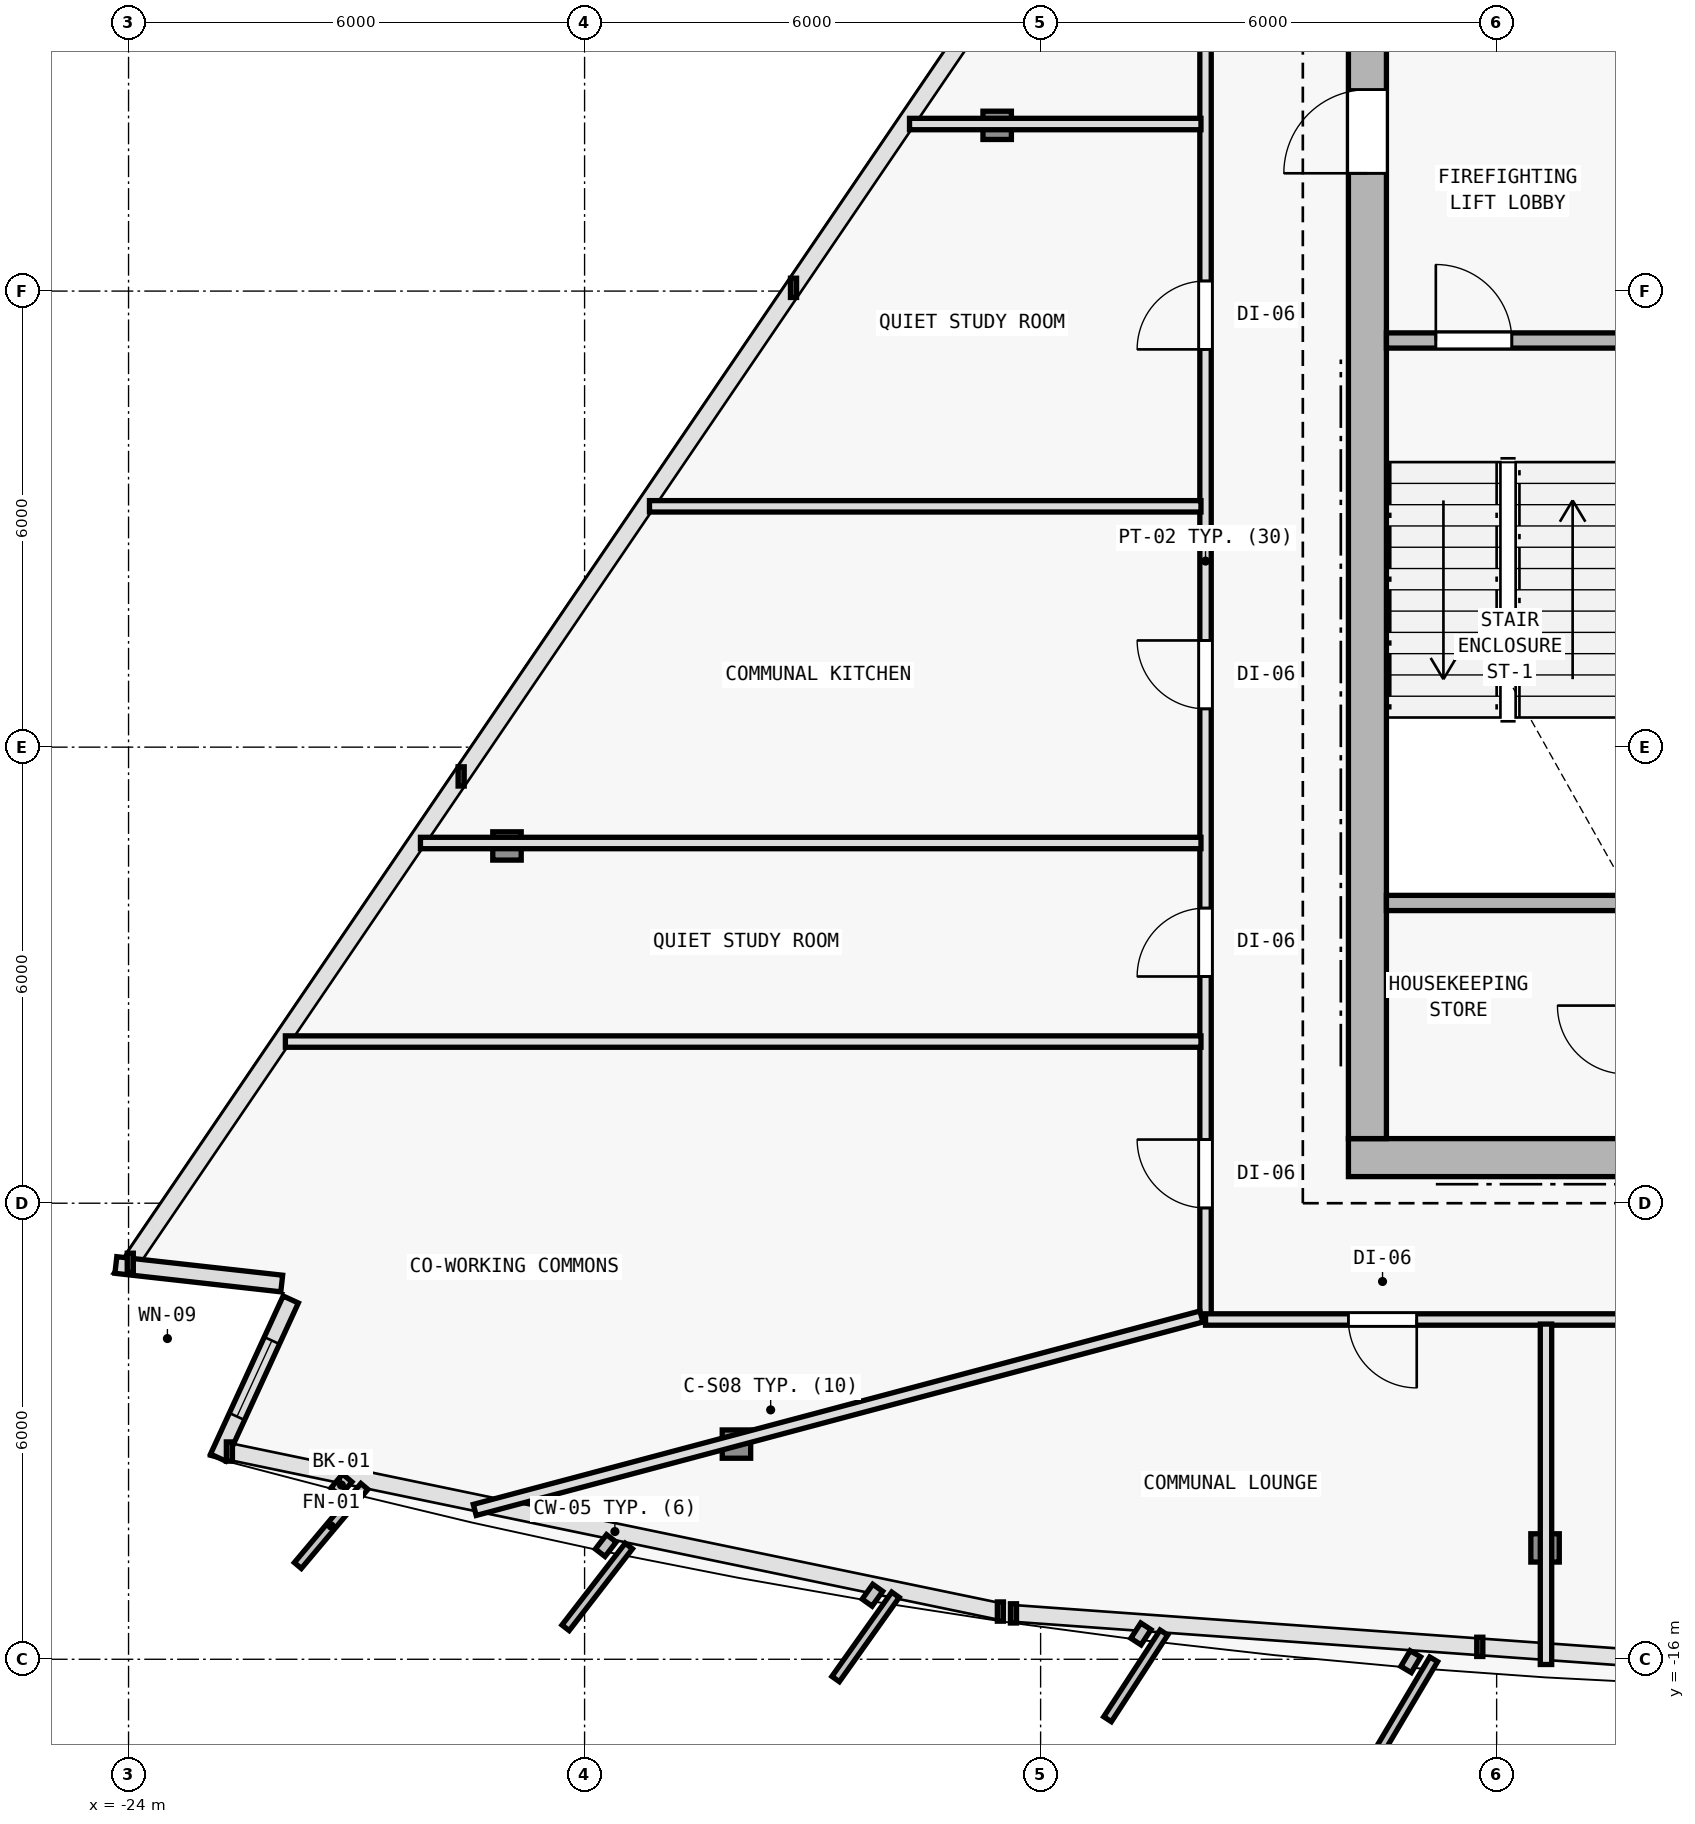
"""IFC4 building model, lengths in metres.
Left out: names, types, materials, properties, quantities, classifications, styles, units other than length and angle.
Written with IfcOpenShell. Run it as: python <this file> out.ifc"""

import sys

from ifc_helpers import new_model, si_unit, direction, frame, frame_2d, origin, origin_2d, place, context, subcontext, project, spatial, rectangle, i_section, extrude, element, fill, save


model = new_model("IFC4")
c1 = context("Model", 3, precision=1e-05, world=origin(), true_north=direction((0.0, 1.0)))
c2 = subcontext(c1, "Body", "Model", "MODEL_VIEW")
j1 = project(units=[si_unit("LENGTHUNIT", "METRE"), si_unit("PLANEANGLEUNIT", "RADIAN")], contexts=[c1])
p1 = place(None, origin())
s1 = spatial("IfcSite", under=j1, at=p1, CompositionType="ELEMENT")
p2 = place(p1, origin())
s2 = spatial("IfcBuilding", under=s1, at=p2, CompositionType="ELEMENT")
p3 = place(p2, frame((0.0, 0.0, 246.3)))
s3 = spatial("IfcBuildingStorey", under=s2, at=p3, CompositionType="ELEMENT", Elevation=246.3)
for number, where, z_axis, x_axis in (
    (1, (-7.7, -9.4, 0.0), (0.0, 0.0, 1.0), (1.0, 0.0, 0.0)),
    (2, (-7.7, 2.0, 0.0), (0.0, 0.0, 1.0), (1.0, 0.0, 0.0)),
):
    element("IfcColumn", number, at=place(p3, frame(where, z_axis=z_axis, x_axis=x_axis)), inside=s3, PredefinedType="COLUMN", context=c2, shape_type="SweptSolid", body=[
        extrude(i_section(OverallWidth=0.398, OverallDepth=0.387, WebThickness=0.013, FlangeThickness=0.022, FilletRadius=0.015, at=origin_2d()), origin(), (0.0, 0.0, 1.0), 4.5),
    ])
p4 = place(p3, frame((-16.002, -13.169, 0.005), z_axis=(0.016525223725, 0.026799129265, 0.999504238936), x_axis=(-0.851183725565, 0.524867855115, 0.0)))
e3 = element("IfcColumn", 3, at=p4, inside=s3, PredefinedType="COLUMN", context=c2, shape_type="SweptSolid", body=[
    extrude(i_section(OverallWidth=0.374, OverallDepth=0.372, WebThickness=0.012, FlangeThickness=0.02, FilletRadius=0.015, at=origin_2d()), origin(), (0.0, 0.0, 1.0), 4.491),
])
p5 = place(p3, frame((-5.363, -14.535, 0.005), z_axis=(0.005545112284, 0.028160472186, 0.99958803491), x_axis=(-0.981159154887, 0.193201223549, 0.0)))
e4 = element("IfcColumn", 4, at=p5, inside=s3, PredefinedType="COLUMN", context=c2, shape_type="SweptSolid", body=[
    extrude(i_section(OverallWidth=0.374, OverallDepth=0.372, WebThickness=0.012, FlangeThickness=0.02, FilletRadius=0.015, at=origin_2d()), origin(), (0.0, 0.0, 1.0), 4.491),
])
p6 = place(p3, frame((-12.571, 4.181, 0.005), z_axis=(0.01359491219, 0.007613150827, 0.99987860178), x_axis=(-0.488603368932, 0.87250601595, 0.0)))
e5 = element("IfcColumn", 5, at=p6, inside=s3, PredefinedType="COLUMN", context=c2, shape_type="SweptSolid", body=[
    extrude(i_section(OverallWidth=0.374, OverallDepth=0.372, WebThickness=0.012, FlangeThickness=0.02, FilletRadius=0.015, at=origin_2d()), origin(), (0.0, 0.0, 1.0), 4.49),
])
p7 = place(p3, frame((-19.021, -5.3, 0.005), z_axis=(0.020170196927, 0.017234373116, 0.99964800782), x_axis=(-0.649609258817, 0.760268249278, 0.0)))
e6 = element("IfcColumn", 6, at=p7, inside=s3, PredefinedType="COLUMN", context=c2, shape_type="SweptSolid", body=[
    extrude(i_section(OverallWidth=0.374, OverallDepth=0.372, WebThickness=0.012, FlangeThickness=0.02, FilletRadius=0.015, at=origin_2d()), origin(), (0.0, 0.0, 1.0), 4.49),
])
p8 = place(p3, frame((-21.985, -11.057, 0.0), z_axis=(0.0, 0.0, 1.0), x_axis=(-0.993823926228, 0.110968480463, 0.0)))
e7 = element("IfcWall", 7, at=p8, inside=s3, PredefinedType="SOLIDWALL", context=c2, shape_type="SweptSolid", body=[
    extrude(rectangle(XDim=2.196, YDim=0.22, at=frame_2d((1.098, 0.0))), origin(), (0.0, 0.0, 1.0), 4.25),
])
p9 = place(p3, frame((-22.822, -13.347, 0.0), z_axis=(0.0, 0.0, 1.0), x_axis=(0.417447808253, 0.908700900949, 0.0)))
e8 = element("IfcWall", 8, at=p9, inside=s3, PredefinedType="SOLIDWALL", context=c2, shape_type="SweptSolid", body=[
    extrude(rectangle(XDim=2.289, YDim=0.22, at=frame_2d((1.145, 0.0))), origin(), (0.0, 0.0, 1.0), 4.25),
])
p10 = place(p9, frame((0.594, 0.0, 0.62)))
e9 = element("IfcOpeningElement", 9, at=p10, cuts=e8, PredefinedType="OPENING", context=c2, shape_type="SweptSolid", body=[
    extrude(rectangle(XDim=1.1, YDim=1.8, at=frame_2d((0.55, 0.9))), frame((0.0, 0.12, 0.0), z_axis=(0.0, -1.0, 0.0), x_axis=(1.0, 0.0, 0.0)), (0.0, 0.0, 1.0), 0.24),
])
p11 = place(p3, frame((-7.95, -9.4, 0.0), z_axis=(0.0, 0.0, 1.0), x_axis=(1.0, 0.0, 0.0)))
e10 = element("IfcWall", 10, at=p11, inside=s3, PredefinedType="SHEAR", context=c2, shape_type="SweptSolid", body=[
    extrude(rectangle(XDim=15.9, YDim=0.5, at=frame_2d((7.95, 0.0))), origin(), (0.0, 0.0, 1.0), 4.25),
])
p12 = place(p11, frame((9.6, 0.0, 0.0)))
e11 = element("IfcOpeningElement", 11, at=p12, cuts=e10, PredefinedType="OPENING", context=c2, shape_type="SweptSolid", body=[
    extrude(rectangle(XDim=1.5, YDim=2.2, at=frame_2d((0.75, 1.1))), frame((0.0, 0.26, 0.0), z_axis=(0.0, -1.0, 0.0), x_axis=(1.0, 0.0, 0.0)), (0.0, 0.0, 1.0), 0.52),
])
p13 = place(p3, frame((-7.7, -9.15, 0.0), z_axis=(0.0, 0.0, 1.0), x_axis=(0.0, 1.0, 0.0)))
e12 = element("IfcWall", 12, at=p13, inside=s3, PredefinedType="SHEAR", context=c2, shape_type="SweptSolid", body=[
    extrude(rectangle(XDim=19.1, YDim=0.5, at=frame_2d((9.55, 0.0))), origin(), (0.0, 0.0, 1.0), 4.25),
])
p14 = place(p13, frame((12.7, 0.0, 0.0)))
e13 = element("IfcOpeningElement", 13, at=p14, cuts=e12, PredefinedType="OPENING", context=c2, shape_type="SweptSolid", body=[
    extrude(rectangle(XDim=1.1, YDim=2.15, at=frame_2d((0.55, 1.075))), frame((0.0, 0.26, 0.0), z_axis=(0.0, -1.0, 0.0), x_axis=(1.0, 0.0, 0.0)), (0.0, 0.0, 1.0), 0.52),
])
p15 = place(p3, frame((-7.45, 1.35, 0.0), z_axis=(0.0, 0.0, 1.0), x_axis=(1.0, 0.0, 0.0)))
e14 = element("IfcWall", 14, at=p15, inside=s3, PredefinedType="SOLIDWALL", context=c2, shape_type="SweptSolid", body=[
    extrude(rectangle(XDim=3.4, YDim=0.2, at=frame_2d((1.7, 0.0))), origin(), (0.0, 0.0, 1.0), 4.25),
])
p16 = place(p15, frame((0.65, 0.0, 0.0)))
e15 = element("IfcOpeningElement", 15, at=p16, cuts=e14, PredefinedType="OPENING", context=c2, shape_type="SweptSolid", body=[
    extrude(rectangle(XDim=1.0, YDim=2.15, at=frame_2d((0.5, 1.075))), frame((0.0, 0.11, 0.0), z_axis=(0.0, -1.0, 0.0), x_axis=(1.0, 0.0, 0.0)), (0.0, 0.0, 1.0), 0.22),
])
p17 = place(p3, frame((-7.45, -6.05, 0.0), z_axis=(0.0, 0.0, 1.0), x_axis=(1.0, 0.0, 0.0)))
e16 = element("IfcWall", 16, at=p17, inside=s3, PredefinedType="SOLIDWALL", context=c2, shape_type="SweptSolid", body=[
    extrude(rectangle(XDim=3.4, YDim=0.2, at=frame_2d((1.7, 0.0))), origin(), (0.0, 0.0, 1.0), 4.25),
])
p18 = place(p3, frame((-9.83, -11.53, 0.0), z_axis=(0.0, 0.0, 1.0), x_axis=(0.0, 1.0, 0.0)))
e17 = element("IfcWall", 17, at=p18, inside=s3, PredefinedType="PARTITIONING", context=c2, shape_type="SweptSolid", body=[
    extrude(rectangle(XDim=19.956, YDim=0.15, at=frame_2d((9.978, 0.0))), origin(), (0.0, 0.0, 1.0), 3.725),
])
p19 = place(p18, frame((8.034, 0.0, 0.0)))
e18 = element("IfcOpeningElement", 18, at=p19, cuts=e17, PredefinedType="OPENING", context=c2, shape_type="SweptSolid", body=[
    extrude(rectangle(XDim=0.9, YDim=2.1, at=frame_2d((0.45, 1.05))), frame((0.0, 0.085, 0.0), z_axis=(0.0, -1.0, 0.0), x_axis=(1.0, 0.0, 0.0)), (0.0, 0.0, 1.0), 0.17),
])
p20 = place(p18, frame((4.513, 0.0, 0.0)))
e19 = element("IfcOpeningElement", 19, at=p20, cuts=e17, PredefinedType="OPENING", context=c2, shape_type="SweptSolid", body=[
    extrude(rectangle(XDim=0.9, YDim=2.1, at=frame_2d((0.45, 1.05))), frame((0.0, 0.085, 0.0), z_axis=(0.0, -1.0, 0.0), x_axis=(1.0, 0.0, 0.0)), (0.0, 0.0, 1.0), 0.17),
])
p21 = place(p18, frame((1.468, 0.0, 0.0)))
e20 = element("IfcOpeningElement", 20, at=p21, cuts=e17, PredefinedType="OPENING", context=c2, shape_type="SweptSolid", body=[
    extrude(rectangle(XDim=0.9, YDim=2.1, at=frame_2d((0.45, 1.05))), frame((0.0, 0.085, 0.0), z_axis=(0.0, -1.0, 0.0), x_axis=(1.0, 0.0, 0.0)), (0.0, 0.0, 1.0), 0.17),
])
p22 = place(p18, frame((12.763, 0.0, 0.0)))
e21 = element("IfcOpeningElement", 21, at=p22, cuts=e17, PredefinedType="OPENING", context=c2, shape_type="SweptSolid", body=[
    extrude(rectangle(XDim=0.9, YDim=2.1, at=frame_2d((0.45, 1.05))), frame((0.0, 0.085, 0.0), z_axis=(0.0, -1.0, 0.0), x_axis=(1.0, 0.0, 0.0)), (0.0, 0.0, 1.0), 0.17),
])
p23 = place(p3, frame((9.83, -11.53, 0.0), z_axis=(0.0, 0.0, 1.0), x_axis=(-1.0, 0.0, 0.0)))
e22 = element("IfcWall", 22, at=p23, inside=s3, PredefinedType="PARTITIONING", context=c2, shape_type="SweptSolid", body=[
    extrude(rectangle(XDim=19.66, YDim=0.15, at=frame_2d((9.83, 0.0))), origin(), (0.0, 0.0, 1.0), 3.905),
])
p24 = place(p23, frame((16.881, 0.0, 0.0)))
e23 = element("IfcOpeningElement", 23, at=p24, cuts=e22, PredefinedType="OPENING", context=c2, shape_type="SweptSolid", body=[
    extrude(rectangle(XDim=0.9, YDim=2.1, at=frame_2d((0.45, 1.05))), frame((0.0, 0.085, 0.0), z_axis=(0.0, -1.0, 0.0), x_axis=(1.0, 0.0, 0.0)), (0.0, 0.0, 1.0), 0.17),
])
p25 = place(p23, frame((11.78, 0.0, 0.0)))
e24 = element("IfcOpeningElement", 24, at=p25, cuts=e22, PredefinedType="OPENING", context=c2, shape_type="SweptSolid", body=[
    extrude(rectangle(XDim=0.9, YDim=2.1, at=frame_2d((0.45, 1.05))), frame((0.0, 0.085, 0.0), z_axis=(0.0, -1.0, 0.0), x_axis=(1.0, 0.0, 0.0)), (0.0, 0.0, 1.0), 0.17),
])
p26 = place(p23, frame((6.43, 0.0, 0.0)))
e25 = element("IfcOpeningElement", 25, at=p26, cuts=e22, PredefinedType="OPENING", context=c2, shape_type="SweptSolid", body=[
    extrude(rectangle(XDim=0.9, YDim=2.1, at=frame_2d((0.45, 1.05))), frame((0.0, 0.085, 0.0), z_axis=(0.0, -1.0, 0.0), x_axis=(1.0, 0.0, 0.0)), (0.0, 0.0, 1.0), 0.17),
])
p27 = place(p23, frame((1.879, 0.0, 0.0)))
e26 = element("IfcOpeningElement", 26, at=p27, cuts=e22, PredefinedType="OPENING", context=c2, shape_type="SweptSolid", body=[
    extrude(rectangle(XDim=0.9, YDim=2.1, at=frame_2d((0.45, 1.05))), frame((0.0, 0.085, 0.0), z_axis=(0.0, -1.0, 0.0), x_axis=(1.0, 0.0, 0.0)), (0.0, 0.0, 1.0), 0.17),
])
p28 = place(p3, frame((-9.884, -11.49, 0.0), z_axis=(0.0, 0.0, 1.0), x_axis=(-0.96635442317, -0.257214169168, 0.0)))
e27 = element("IfcWall", 27, at=p28, inside=s3, PredefinedType="PARTITIONING", context=c2, shape_type="SweptSolid", body=[
    extrude(rectangle(XDim=9.894, YDim=0.15, at=frame_2d((4.947, 0.0))), origin(), (0.0, 0.0, 1.0), 3.775),
])
p29 = place(p3, frame((-5.351, -11.59, 0.0), z_axis=(0.0, 0.0, 1.0), x_axis=(0.0, -1.0, 0.0)))
e28 = element("IfcWall", 28, at=p29, inside=s3, PredefinedType="PARTITIONING", context=c2, shape_type="SweptSolid", body=[
    extrude(rectangle(XDim=4.479, YDim=0.15, at=frame_2d((2.239, 0.0))), origin(), (0.0, 0.0, 1.0), 3.775),
])
p30 = place(p3, frame((-9.89, 4.198, 0.0), z_axis=(0.0, 0.0, 1.0), x_axis=(-1.0, 0.0, 0.0)))
e29 = element("IfcWall", 29, at=p30, inside=s3, PredefinedType="PARTITIONING", context=c2, shape_type="SweptSolid", body=[
    extrude(rectangle(XDim=3.835, YDim=0.15, at=frame_2d((1.917, 0.0))), origin(), (0.0, 0.0, 1.0), 3.725),
])
p31 = place(p3, frame((-9.89, -5.261, 0.0), z_axis=(0.0, 0.0, 1.0), x_axis=(-1.0, 0.0, 0.0)))
e30 = element("IfcWall", 30, at=p31, inside=s3, PredefinedType="PARTITIONING", context=c2, shape_type="SweptSolid", body=[
    extrude(rectangle(XDim=10.27, YDim=0.15, at=frame_2d((5.135, 0.0))), origin(), (0.0, 0.0, 1.0), 3.775),
])
p32 = place(p3, frame((-9.89, -0.832, 0.0), z_axis=(0.0, 0.0, 1.0), x_axis=(-0.999999999434, -3.3646243e-05, 0.0)))
e31 = element("IfcWall", 31, at=p32, inside=s3, PredefinedType="PARTITIONING", context=c2, shape_type="SweptSolid", body=[
    extrude(rectangle(XDim=7.256, YDim=0.15, at=frame_2d((3.628, 0.0))), origin(), (0.0, 0.0, 1.0), 3.775),
])
p33 = place(p3, frame((-9.89, -7.873, 0.0), z_axis=(0.0, 0.0, 1.0), x_axis=(-1.0, 0.0, 0.0)))
e32 = element("IfcWall", 32, at=p33, inside=s3, PredefinedType="PARTITIONING", context=c2, shape_type="SweptSolid", body=[
    extrude(rectangle(XDim=12.047, YDim=0.15, at=frame_2d((6.023, 0.0))), origin(), (0.0, 0.0, 1.0), 3.775),
])
p34 = place(p10, origin())
e33 = element("IfcWindow", 33, at=p34, inside=s3, PartitioningType="SINGLE_PANEL", PredefinedType="WINDOW", context=c2, shape_type="SweptSolid", body=[
    extrude(rectangle(XDim=1.1, YDim=1.8, at=frame_2d((0.55, 0.9))), frame((0.0, 0.03, 0.0), z_axis=(0.0, -1.0, 0.0), x_axis=(1.0, 0.0, 0.0)), (0.0, 0.0, 1.0), 0.06),
])
fill(e9, e33)
p35 = place(p14, origin())
e34 = element("IfcDoor", 34, at=p35, inside=s3, OperationType="SINGLE_SWING_LEFT", PredefinedType="DOOR", context=c2, shape_type="SweptSolid", body=[
    extrude(rectangle(XDim=1.1, YDim=2.15, at=frame_2d((0.55, 1.075))), frame((0.0, 0.025, 0.0), z_axis=(0.0, -1.0, 0.0), x_axis=(1.0, 0.0, 0.0)), (0.0, 0.0, 1.0), 0.05),
])
fill(e13, e34)
p36 = place(p16, origin())
e35 = element("IfcDoor", 35, at=p36, inside=s3, OperationType="SINGLE_SWING_LEFT", PredefinedType="DOOR", context=c2, shape_type="SweptSolid", body=[
    extrude(rectangle(XDim=1.0, YDim=2.15, at=frame_2d((0.5, 1.075))), frame((0.0, 0.025, 0.0), z_axis=(0.0, -1.0, 0.0), x_axis=(1.0, 0.0, 0.0)), (0.0, 0.0, 1.0), 0.05),
])
fill(e15, e35)
p37 = place(p19, origin())
e36 = element("IfcDoor", 36, at=p37, inside=s3, OperationType="SINGLE_SWING_RIGHT", PredefinedType="DOOR", context=c2, shape_type="SweptSolid", body=[
    extrude(rectangle(XDim=0.9, YDim=2.1, at=frame_2d((0.45, 1.05))), frame((0.0, 0.025, 0.0), z_axis=(0.0, -1.0, 0.0), x_axis=(1.0, 0.0, 0.0)), (0.0, 0.0, 1.0), 0.05),
])
fill(e18, e36)
p38 = place(p20, origin())
e37 = element("IfcDoor", 37, at=p38, inside=s3, OperationType="SINGLE_SWING_LEFT", PredefinedType="DOOR", context=c2, shape_type="SweptSolid", body=[
    extrude(rectangle(XDim=0.9, YDim=2.1, at=frame_2d((0.45, 1.05))), frame((0.0, 0.025, 0.0), z_axis=(0.0, -1.0, 0.0), x_axis=(1.0, 0.0, 0.0)), (0.0, 0.0, 1.0), 0.05),
])
fill(e19, e37)
p39 = place(p21, origin())
e38 = element("IfcDoor", 38, at=p39, inside=s3, OperationType="SINGLE_SWING_RIGHT", PredefinedType="DOOR", context=c2, shape_type="SweptSolid", body=[
    extrude(rectangle(XDim=0.9, YDim=2.1, at=frame_2d((0.45, 1.05))), frame((0.0, 0.025, 0.0), z_axis=(0.0, -1.0, 0.0), x_axis=(1.0, 0.0, 0.0)), (0.0, 0.0, 1.0), 0.05),
])
fill(e20, e38)
p40 = place(p24, origin())
e39 = element("IfcDoor", 39, at=p40, inside=s3, OperationType="SINGLE_SWING_LEFT", PredefinedType="DOOR", context=c2, shape_type="SweptSolid", body=[
    extrude(rectangle(XDim=0.9, YDim=2.1, at=frame_2d((0.45, 1.05))), frame((0.0, 0.025, 0.0), z_axis=(0.0, -1.0, 0.0), x_axis=(1.0, 0.0, 0.0)), (0.0, 0.0, 1.0), 0.05),
])
fill(e23, e39)
p41 = place(p22, origin())
e40 = element("IfcDoor", 40, at=p41, inside=s3, OperationType="SINGLE_SWING_LEFT", PredefinedType="DOOR", context=c2, shape_type="SweptSolid", body=[
    extrude(rectangle(XDim=0.9, YDim=2.1, at=frame_2d((0.45, 1.05))), frame((0.0, 0.025, 0.0), z_axis=(0.0, -1.0, 0.0), x_axis=(1.0, 0.0, 0.0)), (0.0, 0.0, 1.0), 0.05),
])
fill(e21, e40)
save(model, sys.argv[1])
